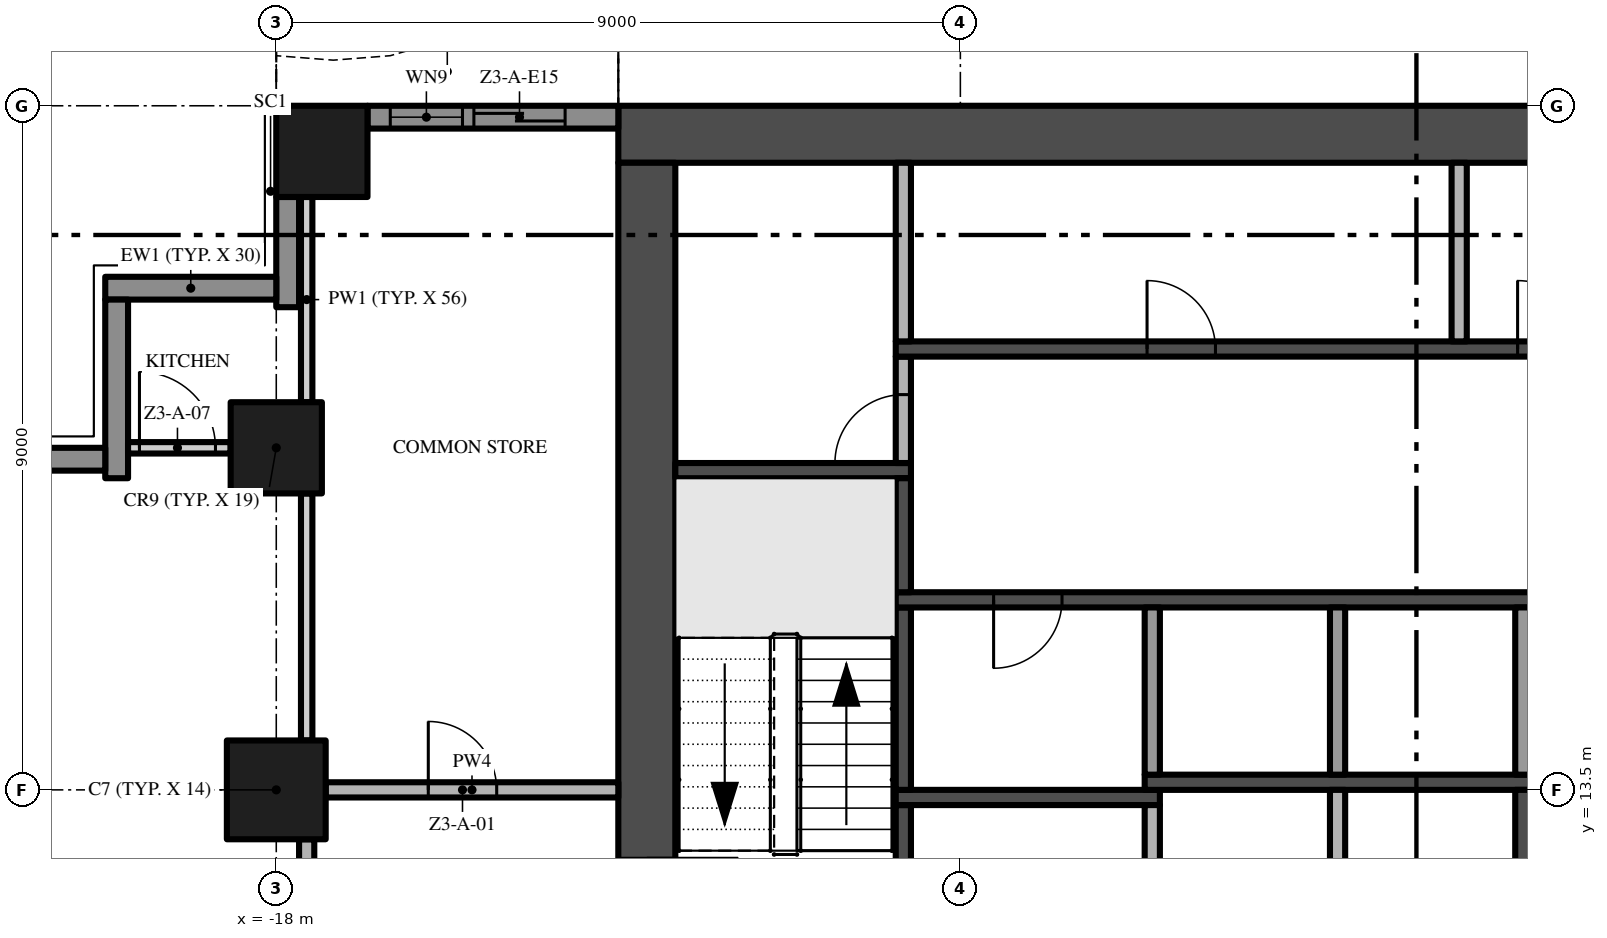
"""IFC4 building model, lengths in metres.
Left out: names, types, materials, properties, quantities, classifications, styles, units other than length and angle.
Written with IfcOpenShell. Run it as: python <this file> out.ifc"""

import sys

from ifc_helpers import new_model, si_unit, direction, frame, frame_2d, origin, origin_2d, place, context, subcontext, project, spatial, polyline, rectangle, outline, extrude, element, fill, save


model = new_model("IFC4")
c1 = context("Model", 3, precision=1e-05, world=origin(), true_north=direction((0.0, 1.0)))
c2 = subcontext(c1, "Body", "Model", "MODEL_VIEW")
j1 = project(units=[si_unit("LENGTHUNIT", "METRE"), si_unit("PLANEANGLEUNIT", "RADIAN")], contexts=[c1])
p1 = place(None, origin())
s1 = spatial("IfcSite", under=j1, at=p1, CompositionType="ELEMENT")
p2 = place(p1, origin())
s2 = spatial("IfcBuilding", under=s1, at=p2, CompositionType="ELEMENT")
p3 = place(p2, frame((0.0, 0.0, 128.8)))
s3 = spatial("IfcBuildingStorey", under=s2, at=p3, CompositionType="ELEMENT", Elevation=128.8)
p4 = place(p3, frame((13.5, 22.125, -0.3), z_axis=(0.0, 0.0, 1.0), x_axis=(-1.0, 0.0, 0.0)))
e1 = element("IfcWall", 1, at=p4, inside=s3, PredefinedType="SHEAR", context=c2, shape_type="SweptSolid", body=[
    extrude(rectangle(XDim=27.0, YDim=0.75, at=frame_2d((13.5, 0.0))), origin(), (0.0, 0.0, 1.0), 3.8),
])
p5 = place(p3, frame((-13.125, 21.75, -0.3), z_axis=(0.0, 0.0, 1.0), x_axis=(0.0, -1.0, 0.0)))
e2 = element("IfcWall", 2, at=p5, inside=s3, PredefinedType="SHEAR", context=c2, shape_type="SweptSolid", body=[
    extrude(rectangle(XDim=16.5, YDim=0.75, at=frame_2d((8.25, 0.0))), origin(), (0.0, 0.0, 1.0), 3.8),
])
p6 = place(p5, frame((9.15, 0.0, 0.3)))
e3 = element("IfcOpeningElement", 3, at=p6, cuts=e2, PredefinedType="OPENING", context=c2, shape_type="SweptSolid", body=[
    extrude(rectangle(XDim=1.2, YDim=2.2, at=frame_2d((0.6, 1.1))), frame((0.0, 0.385, 0.0), z_axis=(0.0, -1.0, 0.0), x_axis=(1.0, 0.0, 0.0)), (0.0, 0.0, 1.0), 0.77),
])
p7 = place(p3, frame((-18.0, 13.5, 0.0), z_axis=(0.0, 0.0, 1.0), x_axis=(1.0, 0.0, 0.0)))
e4 = element("IfcColumn", 4, at=p7, inside=s3, PredefinedType="COLUMN", context=c2, shape_type="SweptSolid", body=[
    extrude(rectangle(XDim=1.3, YDim=1.3, at=origin_2d()), origin(), (0.0, 0.0, 1.0), 3.5),
])
for number, where, z_axis, x_axis in (
    (5, (-17.4, 21.9, 0.0), (0.0, 0.0, 1.0), (1.0, 0.0, 0.0)),
    (6, (-18.0, 18.0, 0.0), (0.0, 0.0, 1.0), (1.0, 0.0, 0.0)),
):
    element("IfcColumn", number, at=place(p3, frame(where, z_axis=z_axis, x_axis=x_axis)), inside=s3, PredefinedType="COLUMN", context=c2, shape_type="SweptSolid", body=[
        extrude(rectangle(XDim=1.2, YDim=1.2, at=origin_2d()), origin(), (0.0, 0.0, 1.0), 3.5),
    ])
p8 = place(p3, frame((-16.8, 22.35, 0.0), z_axis=(0.0, 0.0, 1.0), x_axis=(1.0, 0.0, 0.0)))
e7 = element("IfcWall", 7, at=p8, inside=s3, PredefinedType="SOLIDWALL", context=c2, shape_type="SweptSolid", body=[
    extrude(rectangle(XDim=3.3, YDim=0.3, at=frame_2d((1.65, 0.0))), origin(), (0.0, 0.0, 1.0), 3.5),
])
p9 = place(p8, frame((1.4, 0.0, 0.0)))
e8 = element("IfcOpeningElement", 8, at=p9, cuts=e7, PredefinedType="OPENING", context=c2, shape_type="SweptSolid", body=[
    extrude(rectangle(XDim=1.2, YDim=2.4, at=frame_2d((0.6, 1.2))), frame((0.0, 0.16, 0.0), z_axis=(0.0, -1.0, 0.0), x_axis=(1.0, 0.0, 0.0)), (0.0, 0.0, 1.0), 0.32),
])
p10 = place(p8, frame((0.3, 0.0, 0.45)))
e9 = element("IfcOpeningElement", 9, at=p10, cuts=e7, PredefinedType="OPENING", context=c2, shape_type="SweptSolid", body=[
    extrude(rectangle(XDim=0.95, YDim=2.65, at=frame_2d((0.475, 1.325))), frame((0.0, 0.16, 0.0), z_axis=(0.0, -1.0, 0.0), x_axis=(1.0, 0.0, 0.0)), (0.0, 0.0, 1.0), 0.32),
])
p11 = place(p3, frame((-17.85, 19.85, 0.0), z_axis=(0.0, 0.0, 1.0), x_axis=(0.0, 1.0, 0.0)))
e10 = element("IfcWall", 10, at=p11, inside=s3, PredefinedType="SOLIDWALL", context=c2, shape_type="SweptSolid", body=[
    extrude(rectangle(XDim=1.45, YDim=0.3, at=frame_2d((0.725, 0.0))), origin(), (0.0, 0.0, 1.0), 3.5),
])
p12 = place(p3, frame((-20.25, 20.1, 0.0), z_axis=(0.0, 0.0, 1.0), x_axis=(1.0, 0.0, 0.0)))
e11 = element("IfcWall", 11, at=p12, inside=s3, PredefinedType="SOLIDWALL", context=c2, shape_type="SweptSolid", body=[
    extrude(rectangle(XDim=2.25, YDim=0.3, at=frame_2d((1.125, 0.0))), origin(), (0.0, 0.0, 1.0), 3.5),
])
p13 = place(p3, frame((-20.1, 17.6, 0.0), z_axis=(0.0, 0.0, 1.0), x_axis=(0.0, 1.0, 0.0)))
e12 = element("IfcWall", 12, at=p13, inside=s3, PredefinedType="SOLIDWALL", context=c2, shape_type="SweptSolid", body=[
    extrude(rectangle(XDim=2.35, YDim=0.3, at=frame_2d((1.175, 0.0))), origin(), (0.0, 0.0, 1.0), 3.5),
])
p14 = place(p3, frame((-22.5, 17.85, 0.0), z_axis=(0.0, 0.0, 1.0), x_axis=(1.0, 0.0, 0.0)))
e13 = element("IfcWall", 13, at=p14, inside=s3, PredefinedType="SOLIDWALL", context=c2, shape_type="SweptSolid", body=[
    extrude(rectangle(XDim=2.25, YDim=0.3, at=frame_2d((1.125, 0.0))), origin(), (0.0, 0.0, 1.0), 3.5),
])
p15 = place(p3, origin())
e14 = element("IfcWall", 14, at=p15, inside=s3, PredefinedType="USERDEFINED", context=c2, shape_type="SweptSolid", body=[
    extrude(outline(polyline([(-13.5, 24.3), (-15.0, 23.595), (-16.5, 23.159), (-17.25, 23.1), (-18.0, 23.159), (-18.02, 22.909), (-17.25, 22.849), (-16.455, 22.911), (-14.911, 23.36), (-13.394, 24.074), (-13.5, 24.3)])), origin(), (0.0, 0.0, 1.0), 0.9),
])
p16 = place(p3, frame((-12.75, 17.7, 0.0), z_axis=(0.0, 0.0, 1.0), x_axis=(1.0, 0.0, 0.0)))
e15 = element("IfcWall", 15, at=p16, inside=s3, PredefinedType="SHEAR", context=c2, shape_type="SweptSolid", body=[
    extrude(rectangle(XDim=3.1, YDim=0.2, at=frame_2d((1.55, 0.0))), origin(), (0.0, 0.0, 1.0), 3.5),
])
p17 = place(p3, frame((-9.75, 11.0, 0.0), z_axis=(0.0, 0.0, 1.0), x_axis=(0.0, 1.0, 0.0)))
e16 = element("IfcWall", 16, at=p17, inside=s3, PredefinedType="SHEAR", context=c2, shape_type="SweptSolid", body=[
    extrude(rectangle(XDim=2.3, YDim=0.2, at=frame_2d((1.15, 0.0))), origin(), (0.0, 0.0, 1.0), 3.5),
])
p18 = place(p3, frame((-9.85, 13.4, 0.0), z_axis=(0.0, 0.0, 1.0), x_axis=(1.0, 0.0, 0.0)))
e17 = element("IfcWall", 17, at=p18, inside=s3, PredefinedType="SHEAR", context=c2, shape_type="SweptSolid", body=[
    extrude(rectangle(XDim=3.475, YDim=0.2, at=frame_2d((1.738, 0.0))), origin(), (0.0, 0.0, 1.0), 3.5),
])
p19 = place(p3, frame((-9.75, 13.5, 0.0), z_axis=(0.0, 0.0, 1.0), x_axis=(0.0, 1.0, 0.0)))
e18 = element("IfcWall", 18, at=p19, inside=s3, PredefinedType="SHEAR", context=c2, shape_type="SweptSolid", body=[
    extrude(rectangle(XDim=2.4, YDim=0.2, at=frame_2d((1.2, 0.0))), origin(), (0.0, 0.0, 1.0), 3.5),
])
p20 = place(p3, frame((-1.5, 16.0, 0.0), z_axis=(0.0, 0.0, 1.0), x_axis=(-1.0, 0.0, 0.0)))
e19 = element("IfcWall", 19, at=p20, inside=s3, PredefinedType="SHEAR", context=c2, shape_type="SweptSolid", body=[
    extrude(rectangle(XDim=8.35, YDim=0.2, at=frame_2d((4.175, 0.0))), origin(), (0.0, 0.0, 1.0), 3.5),
])
p21 = place(p20, frame((6.162, 0.0, 0.0)))
e20 = element("IfcOpeningElement", 20, at=p21, cuts=e19, PredefinedType="OPENING", context=c2, shape_type="SweptSolid", body=[
    extrude(rectangle(XDim=0.9, YDim=2.1, at=frame_2d((0.45, 1.05))), frame((0.0, 0.11, 0.0), z_axis=(0.0, -1.0, 0.0), x_axis=(1.0, 0.0, 0.0)), (0.0, 0.0, 1.0), 0.22),
])
p22 = place(p3, frame((-9.75, 16.1, 0.0), z_axis=(0.0, 0.0, 1.0), x_axis=(0.0, 1.0, 0.0)))
e21 = element("IfcWall", 21, at=p22, inside=s3, PredefinedType="SHEAR", context=c2, shape_type="SweptSolid", body=[
    extrude(rectangle(XDim=1.5, YDim=0.2, at=frame_2d((0.75, 0.0))), origin(), (0.0, 0.0, 1.0), 3.5),
])
p23 = place(p3, frame((-9.75, 17.8, 0.0), z_axis=(0.0, 0.0, 1.0), x_axis=(0.0, 1.0, 0.0)))
e22 = element("IfcWall", 22, at=p23, inside=s3, PredefinedType="PARTITIONING", context=c2, shape_type="SweptSolid", body=[
    extrude(rectangle(XDim=1.4, YDim=0.2, at=frame_2d((0.7, 0.0))), origin(), (0.0, 0.0, 1.0), 3.5),
])
p24 = place(p23, origin())
e23 = element("IfcOpeningElement", 23, at=p24, cuts=e22, PredefinedType="OPENING", context=c2, shape_type="SweptSolid", body=[
    extrude(rectangle(XDim=0.9, YDim=2.1, at=frame_2d((0.45, 1.05))), frame((0.0, 0.11, 0.0), z_axis=(0.0, -1.0, 0.0), x_axis=(1.0, 0.0, 0.0)), (0.0, 0.0, 1.0), 0.22),
])
p25 = place(p3, frame((-9.85, 19.3, 0.0), z_axis=(0.0, 0.0, 1.0), x_axis=(1.0, 0.0, 0.0)))
e24 = element("IfcWall", 24, at=p25, inside=s3, PredefinedType="SHEAR", context=c2, shape_type="SweptSolid", body=[
    extrude(rectangle(XDim=19.7, YDim=0.2, at=frame_2d((9.85, 0.0))), origin(), (0.0, 0.0, 1.0), 3.5),
])
p26 = place(p25, frame((10.519, 0.0, 0.0)))
e25 = element("IfcOpeningElement", 25, at=p26, cuts=e24, PredefinedType="OPENING", context=c2, shape_type="SweptSolid", body=[
    extrude(rectangle(XDim=1.1, YDim=2.1, at=frame_2d((0.55, 1.05))), frame((0.0, 0.11, 0.0), z_axis=(0.0, -1.0, 0.0), x_axis=(1.0, 0.0, 0.0)), (0.0, 0.0, 1.0), 0.22),
])
p27 = place(p25, frame((12.956, 0.0, 0.0)))
e26 = element("IfcOpeningElement", 26, at=p27, cuts=e24, PredefinedType="OPENING", context=c2, shape_type="SweptSolid", body=[
    extrude(rectangle(XDim=1.1, YDim=2.1, at=frame_2d((0.55, 1.05))), frame((0.0, 0.11, 0.0), z_axis=(0.0, -1.0, 0.0), x_axis=(1.0, 0.0, 0.0)), (0.0, 0.0, 1.0), 0.22),
])
p28 = place(p25, frame((15.394, 0.0, 0.0)))
e27 = element("IfcOpeningElement", 27, at=p28, cuts=e24, PredefinedType="OPENING", context=c2, shape_type="SweptSolid", body=[
    extrude(rectangle(XDim=1.1, YDim=2.1, at=frame_2d((0.55, 1.05))), frame((0.0, 0.11, 0.0), z_axis=(0.0, -1.0, 0.0), x_axis=(1.0, 0.0, 0.0)), (0.0, 0.0, 1.0), 0.22),
])
p29 = place(p25, frame((17.831, 0.0, 0.0)))
e28 = element("IfcOpeningElement", 28, at=p29, cuts=e24, PredefinedType="OPENING", context=c2, shape_type="SweptSolid", body=[
    extrude(rectangle(XDim=1.1, YDim=2.1, at=frame_2d((0.55, 1.05))), frame((0.0, 0.11, 0.0), z_axis=(0.0, -1.0, 0.0), x_axis=(1.0, 0.0, 0.0)), (0.0, 0.0, 1.0), 0.22),
])
p30 = place(p25, frame((3.306, 0.0, 0.0)))
e29 = element("IfcOpeningElement", 29, at=p30, cuts=e24, PredefinedType="OPENING", context=c2, shape_type="SweptSolid", body=[
    extrude(rectangle(XDim=0.9, YDim=2.1, at=frame_2d((0.45, 1.05))), frame((0.0, 0.11, 0.0), z_axis=(0.0, -1.0, 0.0), x_axis=(1.0, 0.0, 0.0)), (0.0, 0.0, 1.0), 0.22),
])
p31 = place(p25, frame((8.181, 0.0, 0.0)))
e30 = element("IfcOpeningElement", 30, at=p31, cuts=e24, PredefinedType="OPENING", context=c2, shape_type="SweptSolid", body=[
    extrude(rectangle(XDim=0.9, YDim=2.1, at=frame_2d((0.45, 1.05))), frame((0.0, 0.11, 0.0), z_axis=(0.0, -1.0, 0.0), x_axis=(1.0, 0.0, 0.0)), (0.0, 0.0, 1.0), 0.22),
])
p32 = place(p3, frame((-9.75, 19.4, 0.0), z_axis=(0.0, 0.0, 1.0), x_axis=(0.0, 1.0, 0.0)))
e31 = element("IfcWall", 31, at=p32, inside=s3, PredefinedType="PARTITIONING", context=c2, shape_type="SweptSolid", body=[
    extrude(rectangle(XDim=2.35, YDim=0.2, at=frame_2d((1.175, 0.0))), origin(), (0.0, 0.0, 1.0), 3.5),
])
p33 = place(p3, frame((-6.475, 11.0, 0.0), z_axis=(0.0, 0.0, 1.0), x_axis=(0.0, 1.0, 0.0)))
e32 = element("IfcWall", 32, at=p33, inside=s3, PredefinedType="PARTITIONING", context=c2, shape_type="SweptSolid", body=[
    extrude(rectangle(XDim=2.3, YDim=0.2, at=frame_2d((1.15, 0.0))), origin(), (0.0, 0.0, 1.0), 3.5),
])
p34 = place(p3, frame((-6.575, 13.6, 0.0), z_axis=(0.0, 0.0, 1.0), x_axis=(1.0, 0.0, 0.0)))
e33 = element("IfcWall", 33, at=p34, inside=s3, PredefinedType="SHEAR", context=c2, shape_type="SweptSolid", body=[
    extrude(rectangle(XDim=5.075, YDim=0.2, at=frame_2d((2.538, 0.0))), origin(), (0.0, 0.0, 1.0), 3.5),
])
p35 = place(p3, frame((-6.475, 13.7, 0.0), z_axis=(0.0, 0.0, 1.0), x_axis=(0.0, 1.0, 0.0)))
e34 = element("IfcWall", 34, at=p35, inside=s3, PredefinedType="PARTITIONING", context=c2, shape_type="SweptSolid", body=[
    extrude(rectangle(XDim=2.2, YDim=0.2, at=frame_2d((1.1, 0.0))), origin(), (0.0, 0.0, 1.0), 3.5),
])
p36 = place(p3, frame((-4.037, 8.15, 0.0), z_axis=(0.0, 0.0, 1.0), x_axis=(0.0, 1.0, 0.0)))
e35 = element("IfcWall", 35, at=p36, inside=s3, PredefinedType="PARTITIONING", context=c2, shape_type="SweptSolid", body=[
    extrude(rectangle(XDim=5.35, YDim=0.2, at=frame_2d((2.675, 0.0))), origin(), (0.0, 0.0, 1.0), 3.5),
])
p37 = place(p36, frame((2.225, 0.0, 0.0)))
e36 = element("IfcOpeningElement", 36, at=p37, cuts=e35, PredefinedType="OPENING", context=c2, shape_type="SweptSolid", body=[
    extrude(rectangle(XDim=0.9, YDim=2.1, at=frame_2d((0.45, 1.05))), frame((0.0, 0.11, 0.0), z_axis=(0.0, -1.0, 0.0), x_axis=(1.0, 0.0, 0.0)), (0.0, 0.0, 1.0), 0.22),
])
p38 = place(p3, frame((-4.037, 13.7, 0.0), z_axis=(0.0, 0.0, 1.0), x_axis=(0.0, 1.0, 0.0)))
e37 = element("IfcWall", 37, at=p38, inside=s3, PredefinedType="PARTITIONING", context=c2, shape_type="SweptSolid", body=[
    extrude(rectangle(XDim=2.2, YDim=0.2, at=frame_2d((1.1, 0.0))), origin(), (0.0, 0.0, 1.0), 3.5),
])
p39 = place(p3, frame((-2.438, 19.4, 0.0), z_axis=(0.0, 0.0, 1.0), x_axis=(0.0, 1.0, 0.0)))
e38 = element("IfcWall", 38, at=p39, inside=s3, PredefinedType="PARTITIONING", context=c2, shape_type="SweptSolid", body=[
    extrude(rectangle(XDim=2.35, YDim=0.2, at=frame_2d((1.175, 0.0))), origin(), (0.0, 0.0, 1.0), 3.5),
])
p40 = place(p3, frame((-1.6, 8.15, 0.0), z_axis=(0.0, 0.0, 1.0), x_axis=(0.0, 1.0, 0.0)))
e39 = element("IfcWall", 39, at=p40, inside=s3, PredefinedType="SHEAR", context=c2, shape_type="SweptSolid", body=[
    extrude(rectangle(XDim=5.35, YDim=0.2, at=frame_2d((2.675, 0.0))), origin(), (0.0, 0.0, 1.0), 3.5),
])
p41 = place(p40, frame((2.225, 0.0, 0.0)))
e40 = element("IfcOpeningElement", 40, at=p41, cuts=e39, PredefinedType="OPENING", context=c2, shape_type="SweptSolid", body=[
    extrude(rectangle(XDim=0.9, YDim=2.1, at=frame_2d((0.45, 1.05))), frame((0.0, 0.11, 0.0), z_axis=(0.0, -1.0, 0.0), x_axis=(1.0, 0.0, 0.0)), (0.0, 0.0, 1.0), 0.22),
])
p42 = place(p3, frame((-1.6, 13.7, 0.0), z_axis=(0.0, 0.0, 1.0), x_axis=(0.0, 1.0, 0.0)))
e41 = element("IfcWall", 41, at=p42, inside=s3, PredefinedType="PARTITIONING", context=c2, shape_type="SweptSolid", body=[
    extrude(rectangle(XDim=2.2, YDim=0.2, at=frame_2d((1.1, 0.0))), origin(), (0.0, 0.0, 1.0), 3.5),
])
p43 = place(p3, frame((-17.35, 13.5, 0.0), z_axis=(0.0, 0.0, 1.0), x_axis=(1.0, 0.0, 0.0)))
e42 = element("IfcWall", 42, at=p43, inside=s3, PredefinedType="PARTITIONING", context=c2, shape_type="SweptSolid", body=[
    extrude(rectangle(XDim=3.85, YDim=0.2, at=frame_2d((1.925, 0.0))), origin(), (0.0, 0.0, 1.0), 3.5),
])
p44 = place(p43, frame((1.35, 0.0, 0.0)))
e43 = element("IfcOpeningElement", 43, at=p44, cuts=e42, PredefinedType="OPENING", context=c2, shape_type="SweptSolid", body=[
    extrude(rectangle(XDim=0.9, YDim=2.1, at=frame_2d((0.45, 1.05))), frame((0.0, 0.11, 0.0), z_axis=(0.0, -1.0, 0.0), x_axis=(1.0, 0.0, 0.0)), (0.0, 0.0, 1.0), 0.22),
])
p45 = place(p3, frame((-19.95, 18.0, 0.0), z_axis=(0.0, 0.0, 1.0), x_axis=(1.0, 0.0, 0.0)))
e44 = element("IfcWall", 44, at=p45, inside=s3, PredefinedType="PARTITIONING", context=c2, shape_type="SweptSolid", body=[
    extrude(rectangle(XDim=1.35, YDim=0.15, at=frame_2d((0.675, 0.0))), origin(), (0.0, 0.0, 1.0), 3.5),
])
p46 = place(p45, frame((0.15, 0.0, 0.0)))
e45 = element("IfcOpeningElement", 45, at=p46, cuts=e44, PredefinedType="OPENING", context=c2, shape_type="SweptSolid", body=[
    extrude(rectangle(XDim=1.0, YDim=2.4, at=frame_2d((0.5, 1.2))), frame((0.0, 0.085, 0.0), z_axis=(0.0, -1.0, 0.0), x_axis=(1.0, 0.0, 0.0)), (0.0, 0.0, 1.0), 0.17),
])
p47 = place(p3, frame((-17.6, 5.15, 0.0), z_axis=(0.0, 0.0, 1.0), x_axis=(0.0, 1.0, 0.0)))
e46 = element("IfcWall", 46, at=p47, inside=s3, PredefinedType="PARTITIONING", context=c2, shape_type="SweptSolid", body=[
    extrude(rectangle(XDim=7.7, YDim=0.2, at=frame_2d((3.85, 0.0))), origin(), (0.0, 0.0, 1.0), 3.5),
])
p48 = place(p47, frame((1.0, 0.0, 0.0)))
e47 = element("IfcOpeningElement", 47, at=p48, cuts=e46, PredefinedType="OPENING", context=c2, shape_type="SweptSolid", body=[
    extrude(rectangle(XDim=1.2, YDim=2.4, at=frame_2d((0.6, 1.2))), frame((0.0, 0.11, 0.0), z_axis=(0.0, -1.0, 0.0), x_axis=(1.0, 0.0, 0.0)), (0.0, 0.0, 1.0), 0.22),
])
p49 = place(p3, frame((-17.6, 14.15, 0.0), z_axis=(0.0, 0.0, 1.0), x_axis=(0.0, 1.0, 0.0)))
e48 = element("IfcWall", 48, at=p49, inside=s3, PredefinedType="PARTITIONING", context=c2, shape_type="SweptSolid", body=[
    extrude(rectangle(XDim=3.25, YDim=0.15, at=frame_2d((1.625, 0.0))), origin(), (0.0, 0.0, 1.0), 3.5),
])
p50 = place(p3, frame((-17.6, 18.6, 0.0), z_axis=(0.0, 0.0, 1.0), x_axis=(0.0, 1.0, 0.0)))
e49 = element("IfcWall", 49, at=p50, inside=s3, PredefinedType="PARTITIONING", context=c2, shape_type="SweptSolid", body=[
    extrude(rectangle(XDim=2.7, YDim=0.15, at=frame_2d((1.35, 0.0))), origin(), (0.0, 0.0, 1.0), 3.5),
])
p51 = place(p9, origin())
e50 = element("IfcDoor", 50, at=p51, inside=s3, OperationType="SINGLE_SWING_LEFT", PredefinedType="DOOR", context=c2, shape_type="SweptSolid", body=[
    extrude(rectangle(XDim=1.2, YDim=2.4, at=frame_2d((0.6, 1.2))), frame((0.0, 0.025, 0.0), z_axis=(0.0, -1.0, 0.0), x_axis=(1.0, 0.0, 0.0)), (0.0, 0.0, 1.0), 0.05),
])
fill(e8, e50)
p52 = place(p10, origin())
e51 = element("IfcWindow", 51, at=p52, inside=s3, PartitioningType="SINGLE_PANEL", PredefinedType="WINDOW", context=c2, shape_type="SweptSolid", body=[
    extrude(rectangle(XDim=0.95, YDim=2.65, at=frame_2d((0.475, 1.325))), frame((0.0, 0.03, 0.0), z_axis=(0.0, -1.0, 0.0), x_axis=(1.0, 0.0, 0.0)), (0.0, 0.0, 1.0), 0.06),
])
fill(e9, e51)
p53 = place(p21, origin())
e52 = element("IfcDoor", 52, at=p53, inside=s3, OperationType="SINGLE_SWING_RIGHT", PredefinedType="DOOR", context=c2, shape_type="SweptSolid", body=[
    extrude(rectangle(XDim=0.9, YDim=2.1, at=frame_2d((0.45, 1.05))), frame((0.0, 0.025, 0.0), z_axis=(0.0, -1.0, 0.0), x_axis=(1.0, 0.0, 0.0)), (0.0, 0.0, 1.0), 0.05),
])
fill(e20, e52)
p54 = place(p24, origin())
e53 = element("IfcDoor", 53, at=p54, inside=s3, OperationType="SINGLE_SWING_LEFT", PredefinedType="DOOR", context=c2, shape_type="SweptSolid", body=[
    extrude(rectangle(XDim=0.9, YDim=2.1, at=frame_2d((0.45, 1.05))), frame((0.0, 0.025, 0.0), z_axis=(0.0, -1.0, 0.0), x_axis=(1.0, 0.0, 0.0)), (0.0, 0.0, 1.0), 0.05),
])
fill(e23, e53)
p55 = place(p30, origin())
e54 = element("IfcDoor", 54, at=p55, inside=s3, OperationType="SINGLE_SWING_LEFT", PredefinedType="DOOR", context=c2, shape_type="SweptSolid", body=[
    extrude(rectangle(XDim=0.9, YDim=2.1, at=frame_2d((0.45, 1.05))), frame((0.0, 0.025, 0.0), z_axis=(0.0, -1.0, 0.0), x_axis=(1.0, 0.0, 0.0)), (0.0, 0.0, 1.0), 0.05),
])
fill(e29, e54)
p56 = place(p31, origin())
e55 = element("IfcDoor", 55, at=p56, inside=s3, OperationType="SINGLE_SWING_LEFT", PredefinedType="DOOR", context=c2, shape_type="SweptSolid", body=[
    extrude(rectangle(XDim=0.9, YDim=2.1, at=frame_2d((0.45, 1.05))), frame((0.0, 0.025, 0.0), z_axis=(0.0, -1.0, 0.0), x_axis=(1.0, 0.0, 0.0)), (0.0, 0.0, 1.0), 0.05),
])
fill(e30, e55)
p57 = place(p44, origin())
e56 = element("IfcDoor", 56, at=p57, inside=s3, OperationType="SINGLE_SWING_LEFT", PredefinedType="DOOR", context=c2, shape_type="SweptSolid", body=[
    extrude(rectangle(XDim=0.9, YDim=2.1, at=frame_2d((0.45, 1.05))), frame((0.0, 0.025, 0.0), z_axis=(0.0, -1.0, 0.0), x_axis=(1.0, 0.0, 0.0)), (0.0, 0.0, 1.0), 0.05),
])
fill(e43, e56)
p58 = place(p46, origin())
e57 = element("IfcDoor", 57, at=p58, inside=s3, OperationType="SINGLE_SWING_LEFT", PredefinedType="DOOR", context=c2, shape_type="SweptSolid", body=[
    extrude(rectangle(XDim=1.0, YDim=2.4, at=frame_2d((0.5, 1.2))), frame((0.0, 0.025, 0.0), z_axis=(0.0, -1.0, 0.0), x_axis=(1.0, 0.0, 0.0)), (0.0, 0.0, 1.0), 0.05),
])
fill(e45, e57)
save(model, sys.argv[1])
